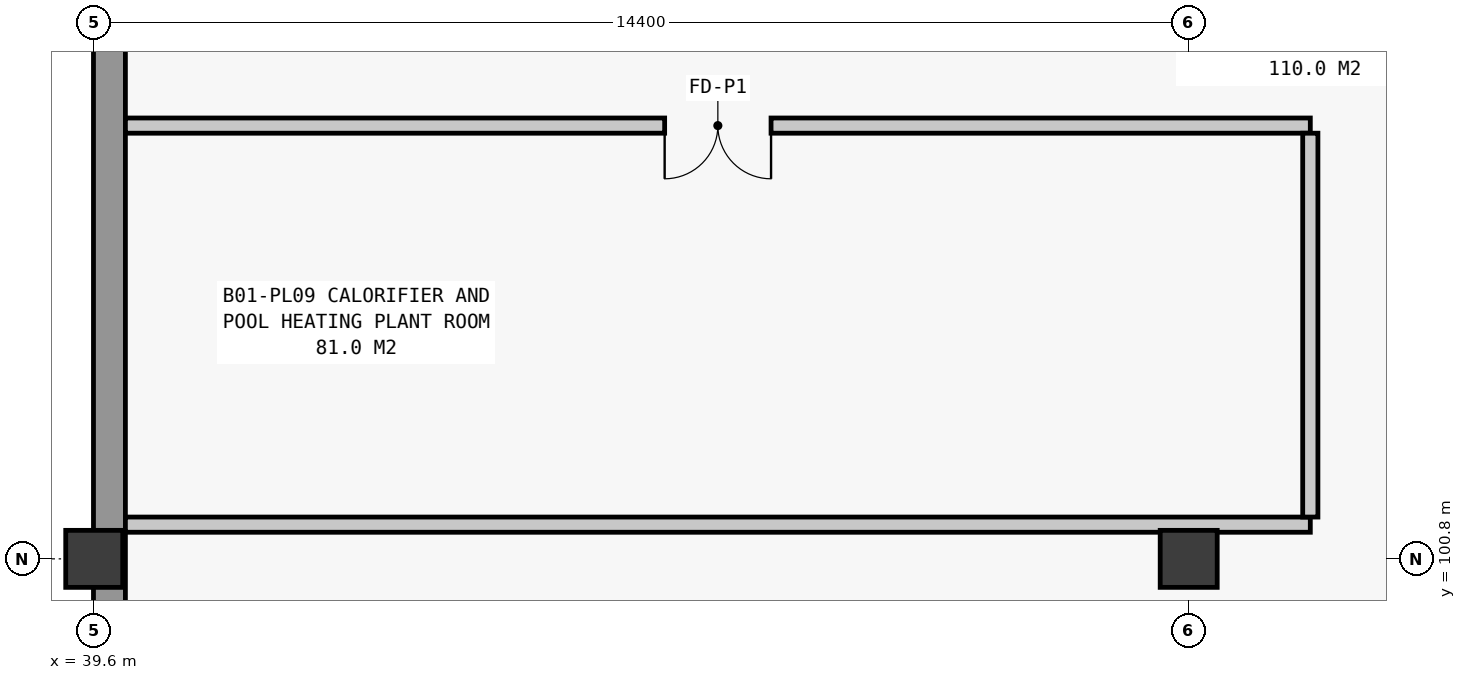
"""IFC4 building model, lengths in metres.
Left out: names, types, materials, properties, quantities, classifications, styles, units other than length and angle.
Written with IfcOpenShell. Run it as: python <this file> out.ifc"""

import sys

from ifc_helpers import new_model, si_unit, direction, frame, frame_2d, origin, origin_2d, place, context, subcontext, project, spatial, rectangle, extrude, element, fill, save


model = new_model("IFC4")
c1 = context("Model", 3, precision=1e-05, world=origin(), true_north=direction((0.0, 1.0)))
c2 = subcontext(c1, "Body", "Model", "MODEL_VIEW")
j1 = project(units=[si_unit("LENGTHUNIT", "METRE"), si_unit("PLANEANGLEUNIT", "RADIAN")], contexts=[c1])
p1 = place(None, origin())
s1 = spatial("IfcSite", under=j1, at=p1, CompositionType="ELEMENT")
p2 = place(p1, origin())
s2 = spatial("IfcBuilding", under=s1, at=p2, CompositionType="ELEMENT")
p3 = place(p2, frame((0.0, 0.0, -4.8)))
s3 = spatial("IfcBuildingStorey", under=s2, at=p3, CompositionType="ELEMENT", Elevation=-4.8)
for number, where, z_axis, x_axis in (
    (1, (39.6, 100.8, 0.0), (0.0, 0.0, 1.0), (1.0, 0.0, 0.0)),
    (2, (54.0, 100.8, 0.0), (0.0, 0.0, 1.0), (1.0, 0.0, 0.0)),
):
    element("IfcColumn", number, at=place(p3, frame(where, z_axis=z_axis, x_axis=x_axis)), inside=s3, PredefinedType="COLUMN", context=c2, shape_type="SweptSolid", body=[
        extrude(rectangle(XDim=0.75, YDim=0.75, at=origin_2d()), origin(), (0.0, 0.0, 1.0), 4.8),
    ])
p4 = place(p3, frame((39.8, 117.4, 0.0), z_axis=(0.0, 0.0, 1.0), x_axis=(0.0, -1.0, 0.0)))
e3 = element("IfcWall", 3, at=p4, inside=s3, PredefinedType="USERDEFINED", context=c2, shape_type="SweptSolid", body=[
    extrude(rectangle(XDim=25.0, YDim=0.42, at=frame_2d((12.5, 0.0))), origin(), (0.0, 0.0, 1.0), 4.5),
])
p5 = place(p3, frame((40.01, 106.5, 0.0), z_axis=(0.0, 0.0, 1.0), x_axis=(1.0, 0.0, 0.0)))
e4 = element("IfcWall", 4, at=p5, inside=s3, PredefinedType="PARTITIONING", context=c2, shape_type="SweptSolid", body=[
    extrude(rectangle(XDim=15.59, YDim=0.2, at=frame_2d((7.795, 0.0))), origin(), (0.0, 0.0, 1.0), 3.75),
])
p6 = place(p5, frame((7.095, 0.0, 0.0)))
e5 = element("IfcOpeningElement", 5, at=p6, cuts=e4, PredefinedType="OPENING", context=c2, shape_type="SweptSolid", body=[
    extrude(rectangle(XDim=1.4, YDim=2.2, at=frame_2d((0.7, 1.1))), frame((0.0, 0.115, 0.0), z_axis=(0.0, -1.0, 0.0), x_axis=(1.0, 0.0, 0.0)), (0.0, 0.0, 1.0), 0.23),
])
p7 = place(p3, frame((40.01, 101.25, 0.0), z_axis=(0.0, 0.0, 1.0), x_axis=(1.0, 0.0, 0.0)))
e6 = element("IfcWall", 6, at=p7, inside=s3, PredefinedType="PARTITIONING", context=c2, shape_type="SweptSolid", body=[
    extrude(rectangle(XDim=15.59, YDim=0.2, at=frame_2d((7.795, 0.0))), origin(), (0.0, 0.0, 1.0), 3.75),
])
p8 = place(p3, frame((55.6, 101.35, 0.0), z_axis=(0.0, 0.0, 1.0), x_axis=(0.0, 1.0, 0.0)))
e7 = element("IfcWall", 7, at=p8, inside=s3, PredefinedType="PARTITIONING", context=c2, shape_type="SweptSolid", body=[
    extrude(rectangle(XDim=5.05, YDim=0.2, at=frame_2d((2.525, 0.0))), origin(), (0.0, 0.0, 1.0), 4.5),
])
p9 = place(p6, frame((1.4, 0.0, 0.0), z_axis=(0.0, 0.0, 1.0), x_axis=(-1.0, 0.0, 0.0)))
e8 = element("IfcDoor", 8, at=p9, inside=s3, OperationType="DOUBLE_DOOR_SINGLE_SWING", PredefinedType="DOOR", context=c2, shape_type="SweptSolid", body=[
    extrude(rectangle(XDim=1.4, YDim=2.2, at=frame_2d((0.7, 1.1))), frame((0.0, 0.025, 0.0), z_axis=(0.0, -1.0, 0.0), x_axis=(1.0, 0.0, 0.0)), (0.0, 0.0, 1.0), 0.05),
])
fill(e5, e8)
save(model, sys.argv[1])
